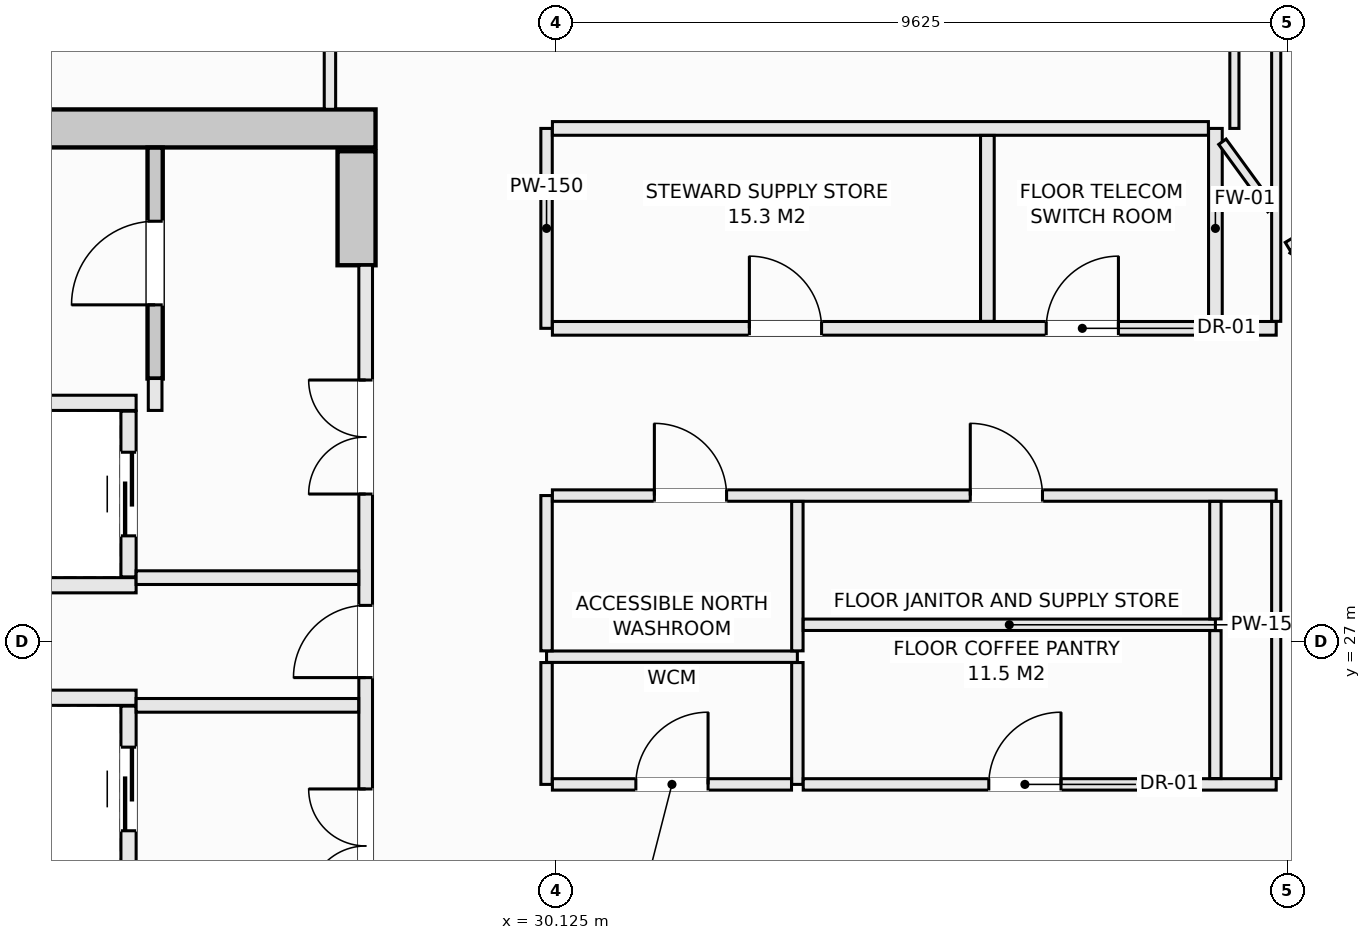
"""IFC4 building model, lengths in metres.
Left out: names, types, materials, properties, quantities, classifications, styles, units other than length and angle.
Written with IfcOpenShell. Run it as: python <this file> out.ifc"""

import sys

from ifc_helpers import new_model, si_unit, direction, frame, frame_2d, origin, place, context, subcontext, project, spatial, rectangle, extrude, element, fill, save


model = new_model("IFC4")
c1 = context("Model", 3, precision=1e-05, world=origin(), true_north=direction((0.0, 1.0)))
c2 = subcontext(c1, "Body", "Model", "MODEL_VIEW")
j1 = project(units=[si_unit("LENGTHUNIT", "METRE"), si_unit("PLANEANGLEUNIT", "RADIAN")], contexts=[c1])
p1 = place(None, origin())
s1 = spatial("IfcSite", under=j1, at=p1, CompositionType="ELEMENT")
p2 = place(p1, origin())
s2 = spatial("IfcBuilding", under=s1, at=p2, CompositionType="ELEMENT")
p3 = place(p2, frame((0.0, 0.0, 242.6)))
s3 = spatial("IfcBuildingStorey", under=s2, at=p3, CompositionType="ELEMENT", Elevation=242.6)
p4 = place(p3, frame((14.25, 33.75, -0.27), z_axis=(0.0, 0.0, 1.0), x_axis=(1.0, 0.0, 0.0)))
e1 = element("IfcWall", 1, at=p4, inside=s3, PredefinedType="SHEAR", context=c2, shape_type="SweptSolid", body=[
    extrude(rectangle(XDim=13.5, YDim=0.5, at=frame_2d((6.75, 0.0))), origin(), (0.0, 0.0, 1.0), 3.3),
])
p5 = place(p3, frame((27.5, 31.95, -0.27), z_axis=(0.0, 0.0, 1.0), x_axis=(0.0, 1.0, 0.0)))
e2 = element("IfcWall", 2, at=p5, inside=s3, PredefinedType="SHEAR", context=c2, shape_type="SweptSolid", body=[
    extrude(rectangle(XDim=1.5, YDim=0.5, at=frame_2d((0.75, 0.0))), origin(), (0.0, 0.0, 1.0), 3.3),
])
p6 = place(p3, frame((24.85, 30.46, -0.27), z_axis=(0.0, 0.0, 1.0), x_axis=(0.0, 1.0, 0.0)))
e3 = element("IfcWall", 3, at=p6, inside=s3, PredefinedType="SHEAR", context=c2, shape_type="SweptSolid", body=[
    extrude(rectangle(XDim=3.038, YDim=0.2, at=frame_2d((1.519, 0.0))), origin(), (0.0, 0.0, 1.0), 3.3),
])
p7 = place(p6, frame((0.969, 0.0, 0.27)))
e4 = element("IfcOpeningElement", 4, at=p7, cuts=e3, PredefinedType="OPENING", context=c2, shape_type="SweptSolid", body=[
    extrude(rectangle(XDim=1.1, YDim=2.15, at=frame_2d((0.55, 1.075))), frame((0.0, 0.11, 0.0), z_axis=(0.0, -1.0, 0.0), x_axis=(1.0, 0.0, 0.0)), (0.0, 0.0, 1.0), 0.22),
])
for number, where, z_axis, x_axis in (
    (5, (22.15, 30.14, 0.0), (0.0, 0.0, 1.0), (1.0, 0.0, 0.0)),
    (6, (22.15, 27.74, 0.0), (0.0, 0.0, 1.0), (1.0, 0.0, 0.0)),
):
    element("IfcWall", number, at=place(p3, frame(where, z_axis=z_axis, x_axis=x_axis)), inside=s3, PredefinedType="SOLIDWALL", context=c2, shape_type="SweptSolid", body=[
        extrude(rectangle(XDim=2.45, YDim=0.2, at=frame_2d((1.225, 0.0))), origin(), (0.0, 0.0, 1.0), 3.03),
    ])
p8 = place(p3, frame((24.5, 27.85, 0.0), z_axis=(0.0, 0.0, 1.0), x_axis=(0.0, 1.0, 0.0)))
e7 = element("IfcWall", 7, at=p8, inside=s3, PredefinedType="SOLIDWALL", context=c2, shape_type="SweptSolid", body=[
    extrude(rectangle(XDim=2.18, YDim=0.2, at=frame_2d((1.09, 0.0))), origin(), (0.0, 0.0, 1.0), 3.03),
])
p9 = place(p8, frame((0.54, 0.0, 0.0)))
e8 = element("IfcOpeningElement", 8, at=p9, cuts=e7, PredefinedType="OPENING", context=c2, shape_type="SweptSolid", body=[
    extrude(rectangle(XDim=1.1, YDim=2.2, at=frame_2d((0.55, 1.1))), frame((0.0, 0.11, 0.0), z_axis=(0.0, -1.0, 0.0), x_axis=(1.0, 0.0, 0.0)), (0.0, 0.0, 1.0), 0.22),
])
p10 = place(p3, frame((22.15, 26.26, 0.0), z_axis=(0.0, 0.0, 1.0), x_axis=(1.0, 0.0, 0.0)))
e9 = element("IfcWall", 9, at=p10, inside=s3, PredefinedType="SOLIDWALL", context=c2, shape_type="SweptSolid", body=[
    extrude(rectangle(XDim=2.45, YDim=0.2, at=frame_2d((1.225, 0.0))), origin(), (0.0, 0.0, 1.0), 3.03),
])
p11 = place(p3, frame((24.5, 23.97, 0.0), z_axis=(0.0, 0.0, 1.0), x_axis=(0.0, 1.0, 0.0)))
e10 = element("IfcWall", 10, at=p11, inside=s3, PredefinedType="SOLIDWALL", context=c2, shape_type="SweptSolid", body=[
    extrude(rectangle(XDim=2.18, YDim=0.2, at=frame_2d((1.09, 0.0))), origin(), (0.0, 0.0, 1.0), 3.03),
])
p12 = place(p11, frame((0.54, 0.0, 0.0)))
e11 = element("IfcOpeningElement", 11, at=p12, cuts=e10, PredefinedType="OPENING", context=c2, shape_type="SweptSolid", body=[
    extrude(rectangle(XDim=1.1, YDim=2.2, at=frame_2d((0.55, 1.1))), frame((0.0, 0.11, 0.0), z_axis=(0.0, -1.0, 0.0), x_axis=(1.0, 0.0, 0.0)), (0.0, 0.0, 1.0), 0.22),
])
p13 = place(p3, frame((24.85, 30.04, 0.0), z_axis=(0.0, 0.0, 1.0), x_axis=(0.0, 1.0, 0.0)))
e12 = element("IfcWall", 12, at=p13, inside=s3, PredefinedType="SOLIDWALL", context=c2, shape_type="SweptSolid", body=[
    extrude(rectangle(XDim=0.42, YDim=0.18, at=frame_2d((0.21, 0.0))), origin(), (0.0, 0.0, 1.0), 3.03),
])
p14 = place(p3, frame((27.62, 22.05, 0.0), z_axis=(0.0, 0.0, 1.0), x_axis=(0.0, 1.0, 0.0)))
e13 = element("IfcWall", 13, at=p14, inside=s3, PredefinedType="SOLIDWALL", context=c2, shape_type="SweptSolid", body=[
    extrude(rectangle(XDim=9.9, YDim=0.18, at=frame_2d((4.95, 0.0))), origin(), (0.0, 0.0, 1.0), 3.03),
])
p15 = place(p14, frame((4.475, 0.0, 0.0)))
e14 = element("IfcOpeningElement", 14, at=p15, cuts=e13, PredefinedType="OPENING", context=c2, shape_type="SweptSolid", body=[
    extrude(rectangle(XDim=0.95, YDim=2.1, at=frame_2d((0.475, 1.05))), frame((0.0, 0.1, 0.0), z_axis=(0.0, -1.0, 0.0), x_axis=(1.0, 0.0, 0.0)), (0.0, 0.0, 1.0), 0.2),
])
p16 = place(p14, frame((6.89, 0.0, 0.0)))
e15 = element("IfcOpeningElement", 15, at=p16, cuts=e13, PredefinedType="OPENING", context=c2, shape_type="SweptSolid", body=[
    extrude(rectangle(XDim=1.5, YDim=2.2, at=frame_2d((0.75, 1.1))), frame((0.0, 0.1, 0.0), z_axis=(0.0, -1.0, 0.0), x_axis=(1.0, 0.0, 0.0)), (0.0, 0.0, 1.0), 0.2),
])
p17 = place(p14, frame((1.51, 0.0, 0.0)))
e16 = element("IfcOpeningElement", 16, at=p17, cuts=e13, PredefinedType="OPENING", context=c2, shape_type="SweptSolid", body=[
    extrude(rectangle(XDim=1.5, YDim=2.2, at=frame_2d((0.75, 1.1))), frame((0.0, 0.1, 0.0), z_axis=(0.0, -1.0, 0.0), x_axis=(1.0, 0.0, 0.0)), (0.0, 0.0, 1.0), 0.2),
])
for number, where, z_axis, x_axis in (
    (17, (24.6, 27.84, 0.0), (0.0, 0.0, 1.0), (1.0, 0.0, 0.0)),
    (18, (24.6, 26.16, 0.0), (0.0, 0.0, 1.0), (1.0, 0.0, 0.0)),
):
    element("IfcWall", number, at=place(p3, frame(where, z_axis=z_axis, x_axis=x_axis)), inside=s3, PredefinedType="SOLIDWALL", context=c2, shape_type="SweptSolid", body=[
        extrude(rectangle(XDim=2.928, YDim=0.18, at=frame_2d((1.464, 0.0))), origin(), (0.0, 0.0, 1.0), 3.03),
    ])
p18 = place(p3, frame((27.15, 34.002, 0.0), z_axis=(0.0, 0.0, 1.0), x_axis=(0.0, 1.0, 0.0)))
e19 = element("IfcWall", 19, at=p18, inside=s3, PredefinedType="PARTITIONING", context=c2, shape_type="SweptSolid", body=[
    extrude(rectangle(XDim=4.198, YDim=0.15, at=frame_2d((2.099, 0.0))), origin(), (0.0, 0.0, 1.0), 3.03),
])
p19 = place(p18, frame((1.998, 0.0, 0.0)))
e20 = element("IfcOpeningElement", 20, at=p19, cuts=e19, PredefinedType="OPENING", context=c2, shape_type="SweptSolid", body=[
    extrude(rectangle(XDim=0.95, YDim=2.1, at=frame_2d((0.475, 1.05))), frame((0.0, 0.085, 0.0), z_axis=(0.0, -1.0, 0.0), x_axis=(1.0, 0.0, 0.0)), (0.0, 0.0, 1.0), 0.17),
])
p20 = place(p3, frame((30.0, 26.8, 0.0), z_axis=(0.0, 0.0, 1.0), x_axis=(1.0, 0.0, 0.0)))
e21 = element("IfcWall", 21, at=p20, inside=s3, PredefinedType="PARTITIONING", context=c2, shape_type="SweptSolid", body=[
    extrude(rectangle(XDim=3.3, YDim=0.15, at=frame_2d((1.65, 0.0))), origin(), (0.0, 0.0, 1.0), 3.03),
])
p21 = place(p3, frame((30.0, 25.12, 0.0), z_axis=(0.0, 0.0, 1.0), x_axis=(0.0, 1.0, 0.0)))
e22 = element("IfcWall", 22, at=p21, inside=s3, PredefinedType="PARTITIONING", context=c2, shape_type="SweptSolid", body=[
    extrude(rectangle(XDim=1.603, YDim=0.15, at=frame_2d((0.801, 0.0))), origin(), (0.0, 0.0, 1.0), 3.03),
])
p22 = place(p3, frame((30.0, 26.877, 0.0), z_axis=(0.0, 0.0, 1.0), x_axis=(0.0, 1.0, 0.0)))
e23 = element("IfcWall", 23, at=p22, inside=s3, PredefinedType="PARTITIONING", context=c2, shape_type="SweptSolid", body=[
    extrude(rectangle(XDim=2.043, YDim=0.15, at=frame_2d((1.021, 0.0))), origin(), (0.0, 0.0, 1.0), 3.03),
])
p23 = place(p3, frame((30.0, 31.12, 0.0), z_axis=(0.0, 0.0, 1.0), x_axis=(0.0, 1.0, 0.0)))
e24 = element("IfcWall", 24, at=p23, inside=s3, PredefinedType="PARTITIONING", context=c2, shape_type="SweptSolid", body=[
    extrude(rectangle(XDim=2.63, YDim=0.15, at=frame_2d((1.315, 0.0))), origin(), (0.0, 0.0, 1.0), 3.03),
])
p24 = place(p3, frame((30.077, 28.92, 0.0), z_axis=(0.0, 0.0, 1.0), x_axis=(1.0, 0.0, 0.0)))
e25 = element("IfcWall", 25, at=p24, inside=s3, PredefinedType="PARTITIONING", context=c2, shape_type="SweptSolid", body=[
    extrude(rectangle(XDim=9.523, YDim=0.15, at=frame_2d((4.762, 0.0))), origin(), (0.0, 0.0, 1.0), 3.03),
])
p25 = place(p24, frame((1.342, 0.0, 0.0)))
e26 = element("IfcOpeningElement", 26, at=p25, cuts=e25, PredefinedType="OPENING", context=c2, shape_type="SweptSolid", body=[
    extrude(rectangle(XDim=0.95, YDim=2.1, at=frame_2d((0.475, 1.05))), frame((0.0, 0.085, 0.0), z_axis=(0.0, -1.0, 0.0), x_axis=(1.0, 0.0, 0.0)), (0.0, 0.0, 1.0), 0.17),
])
p26 = place(p24, frame((5.498, 0.0, 0.0)))
e27 = element("IfcOpeningElement", 27, at=p26, cuts=e25, PredefinedType="OPENING", context=c2, shape_type="SweptSolid", body=[
    extrude(rectangle(XDim=0.95, YDim=2.1, at=frame_2d((0.475, 1.05))), frame((0.0, 0.085, 0.0), z_axis=(0.0, -1.0, 0.0), x_axis=(1.0, 0.0, 0.0)), (0.0, 0.0, 1.0), 0.17),
])
p27 = place(p3, frame((33.3, 25.12, 0.0), z_axis=(0.0, 0.0, 1.0), x_axis=(0.0, 1.0, 0.0)))
e28 = element("IfcWall", 28, at=p27, inside=s3, PredefinedType="PARTITIONING", context=c2, shape_type="SweptSolid", body=[
    extrude(rectangle(XDim=1.603, YDim=0.15, at=frame_2d((0.801, 0.0))), origin(), (0.0, 0.0, 1.0), 3.03),
])
p28 = place(p3, frame((33.3, 26.877, 0.0), z_axis=(0.0, 0.0, 1.0), x_axis=(0.0, 1.0, 0.0)))
e29 = element("IfcWall", 29, at=p28, inside=s3, PredefinedType="PARTITIONING", context=c2, shape_type="SweptSolid", body=[
    extrude(rectangle(XDim=1.966, YDim=0.15, at=frame_2d((0.983, 0.0))), origin(), (0.0, 0.0, 1.0), 3.03),
])
p29 = place(p3, frame((30.077, 25.12, 0.0), z_axis=(0.0, 0.0, 1.0), x_axis=(1.0, 0.0, 0.0)))
e30 = element("IfcWall", 30, at=p29, inside=s3, PredefinedType="PARTITIONING", context=c2, shape_type="SweptSolid", body=[
    extrude(rectangle(XDim=3.146, YDim=0.15, at=frame_2d((1.573, 0.0))), origin(), (0.0, 0.0, 1.0), 3.03),
])
p30 = place(p29, frame((1.098, 0.0, 0.0)))
e31 = element("IfcOpeningElement", 31, at=p30, cuts=e30, PredefinedType="OPENING", context=c2, shape_type="SweptSolid", body=[
    extrude(rectangle(XDim=0.95, YDim=2.1, at=frame_2d((0.475, 1.05))), frame((0.0, 0.085, 0.0), z_axis=(0.0, -1.0, 0.0), x_axis=(1.0, 0.0, 0.0)), (0.0, 0.0, 1.0), 0.17),
])
p31 = place(p3, frame((33.377, 25.12, 0.0), z_axis=(0.0, 0.0, 1.0), x_axis=(1.0, 0.0, 0.0)))
e32 = element("IfcWall", 32, at=p31, inside=s3, PredefinedType="PARTITIONING", context=c2, shape_type="SweptSolid", body=[
    extrude(rectangle(XDim=6.223, YDim=0.15, at=frame_2d((3.112, 0.0))), origin(), (0.0, 0.0, 1.0), 3.03),
])
p32 = place(p31, frame((2.441, 0.0, 0.0)))
e33 = element("IfcOpeningElement", 33, at=p32, cuts=e32, PredefinedType="OPENING", context=c2, shape_type="SweptSolid", body=[
    extrude(rectangle(XDim=0.95, YDim=2.1, at=frame_2d((0.475, 1.05))), frame((0.0, 0.085, 0.0), z_axis=(0.0, -1.0, 0.0), x_axis=(1.0, 0.0, 0.0)), (0.0, 0.0, 1.0), 0.17),
])
p33 = place(p3, frame((33.377, 27.22, 0.0), z_axis=(0.0, 0.0, 1.0), x_axis=(1.0, 0.0, 0.0)))
e34 = element("IfcWall", 34, at=p33, inside=s3, PredefinedType="PARTITIONING", context=c2, shape_type="SweptSolid", body=[
    extrude(rectangle(XDim=5.423, YDim=0.15, at=frame_2d((2.711, 0.0))), origin(), (0.0, 0.0, 1.0), 3.03),
])
p34 = place(p3, frame((38.8, 25.197, 0.0), z_axis=(0.0, 0.0, 1.0), x_axis=(0.0, 1.0, 0.0)))
e35 = element("IfcWall", 35, at=p34, inside=s3, PredefinedType="PARTITIONING", context=c2, shape_type="SweptSolid", body=[
    extrude(rectangle(XDim=1.946, YDim=0.15, at=frame_2d((0.973, 0.0))), origin(), (0.0, 0.0, 1.0), 3.03),
])
p35 = place(p3, frame((38.8, 27.297, 0.0), z_axis=(0.0, 0.0, 1.0), x_axis=(0.0, 1.0, 0.0)))
e36 = element("IfcWall", 36, at=p35, inside=s3, PredefinedType="PARTITIONING", context=c2, shape_type="SweptSolid", body=[
    extrude(rectangle(XDim=1.546, YDim=0.15, at=frame_2d((0.773, 0.0))), origin(), (0.0, 0.0, 1.0), 3.03),
])
p36 = place(p3, frame((38.8, 31.12, 0.0), z_axis=(0.0, 0.0, 1.0), x_axis=(0.0, 1.0, 0.0)))
e37 = element("IfcWall", 37, at=p36, inside=s3, PredefinedType="SOLIDWALL", context=c2, shape_type="SweptSolid", body=[
    extrude(rectangle(XDim=2.63, YDim=0.18, at=frame_2d((1.315, 0.0))), origin(), (0.0, 0.0, 1.0), 3.03),
])
p37 = place(p3, frame((30.077, 31.12, 0.0), z_axis=(0.0, 0.0, 1.0), x_axis=(1.0, 0.0, 0.0)))
e38 = element("IfcWall", 38, at=p37, inside=s3, PredefinedType="SOLIDWALL", context=c2, shape_type="SweptSolid", body=[
    extrude(rectangle(XDim=8.631, YDim=0.18, at=frame_2d((4.315, 0.0))), origin(), (0.0, 0.0, 1.0), 3.03),
])
p38 = place(p37, frame((2.592, 0.0, 0.0)))
e39 = element("IfcOpeningElement", 39, at=p38, cuts=e38, PredefinedType="OPENING", context=c2, shape_type="SweptSolid", body=[
    extrude(rectangle(XDim=0.95, YDim=2.1, at=frame_2d((0.475, 1.05))), frame((0.0, 0.1, 0.0), z_axis=(0.0, -1.0, 0.0), x_axis=(1.0, 0.0, 0.0)), (0.0, 0.0, 1.0), 0.2),
])
p39 = place(p37, frame((6.497, 0.0, 0.0)))
e40 = element("IfcOpeningElement", 40, at=p39, cuts=e38, PredefinedType="OPENING", context=c2, shape_type="SweptSolid", body=[
    extrude(rectangle(XDim=0.95, YDim=2.1, at=frame_2d((0.475, 1.05))), frame((0.0, 0.1, 0.0), z_axis=(0.0, -1.0, 0.0), x_axis=(1.0, 0.0, 0.0)), (0.0, 0.0, 1.0), 0.2),
])
p40 = place(p3, frame((38.892, 31.12, 0.0), z_axis=(0.0, 0.0, 1.0), x_axis=(1.0, 0.0, 0.0)))
e41 = element("IfcWall", 41, at=p40, inside=s3, PredefinedType="SOLIDWALL", context=c2, shape_type="SweptSolid", body=[
    extrude(rectangle(XDim=0.708, YDim=0.18, at=frame_2d((0.354, 0.0))), origin(), (0.0, 0.0, 1.0), 3.03),
])
p41 = place(p3, frame((30.077, 33.75, 0.0), z_axis=(0.0, 0.0, 1.0), x_axis=(1.0, 0.0, 0.0)))
e42 = element("IfcWall", 42, at=p41, inside=s3, PredefinedType="SOLIDWALL", context=c2, shape_type="SweptSolid", body=[
    extrude(rectangle(XDim=8.631, YDim=0.18, at=frame_2d((4.315, 0.0))), origin(), (0.0, 0.0, 1.0), 3.03),
])
p42 = place(p3, frame((35.8, 31.212, 0.0), z_axis=(0.0, 0.0, 1.0), x_axis=(0.0, 1.0, 0.0)))
e43 = element("IfcWall", 43, at=p42, inside=s3, PredefinedType="SOLIDWALL", context=c2, shape_type="SweptSolid", body=[
    extrude(rectangle(XDim=2.446, YDim=0.18, at=frame_2d((1.223, 0.0))), origin(), (0.0, 0.0, 1.0), 3.03),
])
p43 = place(p3, frame((39.05, 33.75, 0.0), z_axis=(0.0, 0.0, 1.0), x_axis=(0.0, 1.0, 0.0)))
e44 = element("IfcWall", 44, at=p43, inside=s3, PredefinedType="PARTITIONING", context=c2, shape_type="SweptSolid", body=[
    extrude(rectangle(XDim=1.938, YDim=0.12, at=frame_2d((0.969, 0.0))), origin(), (0.0, 0.0, 1.0), 3.03),
])
p44 = place(p3, frame((39.6, 25.197, 0.0), z_axis=(0.0, 0.0, 1.0), x_axis=(0.0, 1.0, 0.0)))
e45 = element("IfcWall", 45, at=p44, inside=s3, PredefinedType="PARTITIONING", context=c2, shape_type="SweptSolid", body=[
    extrude(rectangle(XDim=3.646, YDim=0.12, at=frame_2d((1.823, 0.0))), origin(), (0.0, 0.0, 1.0), 3.03),
])
p45 = place(p3, frame((39.6, 31.212, 0.0), z_axis=(0.0, 0.0, 1.0), x_axis=(0.0, 1.0, 0.0)))
e46 = element("IfcWall", 46, at=p45, inside=s3, PredefinedType="PARTITIONING", context=c2, shape_type="SweptSolid", body=[
    extrude(rectangle(XDim=7.871, YDim=0.12, at=frame_2d((3.936, 0.0))), origin(), (0.0, 0.0, 1.0), 3.03),
])
p46 = place(p45, frame((4.706, 0.0, 0.0)))
e47 = element("IfcOpeningElement", 47, at=p46, cuts=e46, PredefinedType="OPENING", context=c2, shape_type="SweptSolid", body=[
    extrude(rectangle(XDim=0.95, YDim=2.1, at=frame_2d((0.475, 1.05))), frame((0.0, 0.07, 0.0), z_axis=(0.0, -1.0, 0.0), x_axis=(1.0, 0.0, 0.0)), (0.0, 0.0, 1.0), 0.14),
])
p47 = place(p3, frame((39.75, 32.199, 0.0), z_axis=(0.0, 0.0, 1.0), x_axis=(0.857702120906, 0.514146935996, 0.0)))
e48 = element("IfcWall", 48, at=p47, inside=s3, PredefinedType="PARTITIONING", context=c2, shape_type="SweptSolid", body=[
    extrude(rectangle(XDim=1.441, YDim=0.12, at=frame_2d((0.721, 0.0))), origin(), (0.0, 0.0, 1.0), 3.03),
])
p48 = place(p3, frame((39.81, 32.163, 0.0), z_axis=(0.0, 0.0, 1.0), x_axis=(0.858011245414, -0.513630901273, 0.0)))
e49 = element("IfcWall", 49, at=p48, inside=s3, PredefinedType="PARTITIONING", context=c2, shape_type="SweptSolid", body=[
    extrude(rectangle(XDim=1.37, YDim=0.12, at=frame_2d((0.685, 0.0))), origin(), (0.0, 0.0, 1.0), 3.03),
])
p49 = place(p3, frame((38.892, 33.575, 0.0), z_axis=(0.0, 0.0, 1.0), x_axis=(0.5886213307, -0.808408887287, 0.0)))
e50 = element("IfcWall", 50, at=p49, inside=s3, PredefinedType="PARTITIONING", context=c2, shape_type="SweptSolid", body=[
    extrude(rectangle(XDim=1.097, YDim=0.12, at=frame_2d((0.549, 0.0))), origin(), (0.0, 0.0, 1.0), 3.03),
])
p50 = place(p7, origin())
e51 = element("IfcDoor", 51, at=p50, inside=s3, OperationType="SINGLE_SWING_LEFT", PredefinedType="DOOR", context=c2, shape_type="SweptSolid", body=[
    extrude(rectangle(XDim=1.1, YDim=2.15, at=frame_2d((0.55, 1.075))), frame((0.0, 0.025, 0.0), z_axis=(0.0, -1.0, 0.0), x_axis=(1.0, 0.0, 0.0)), (0.0, 0.0, 1.0), 0.05),
])
fill(e4, e51)
p51 = place(p9, origin())
e52 = element("IfcDoor", 52, at=p51, inside=s3, OperationType="SLIDING_TO_LEFT", PredefinedType="DOOR", context=c2, shape_type="SweptSolid", body=[
    extrude(rectangle(XDim=1.1, YDim=2.2, at=frame_2d((0.55, 1.1))), frame((0.0, 0.025, 0.0), z_axis=(0.0, -1.0, 0.0), x_axis=(1.0, 0.0, 0.0)), (0.0, 0.0, 1.0), 0.05),
])
fill(e8, e52)
p52 = place(p12, origin())
e53 = element("IfcDoor", 53, at=p52, inside=s3, OperationType="SLIDING_TO_LEFT", PredefinedType="DOOR", context=c2, shape_type="SweptSolid", body=[
    extrude(rectangle(XDim=1.1, YDim=2.2, at=frame_2d((0.55, 1.1))), frame((0.0, 0.025, 0.0), z_axis=(0.0, -1.0, 0.0), x_axis=(1.0, 0.0, 0.0)), (0.0, 0.0, 1.0), 0.05),
])
fill(e11, e53)
p53 = place(p15, origin())
e54 = element("IfcDoor", 54, at=p53, inside=s3, OperationType="SINGLE_SWING_LEFT", PredefinedType="DOOR", context=c2, shape_type="SweptSolid", body=[
    extrude(rectangle(XDim=0.95, YDim=2.1, at=frame_2d((0.475, 1.05))), frame((0.0, 0.025, 0.0), z_axis=(0.0, -1.0, 0.0), x_axis=(1.0, 0.0, 0.0)), (0.0, 0.0, 1.0), 0.05),
])
fill(e14, e54)
p54 = place(p16, origin())
e55 = element("IfcDoor", 55, at=p54, inside=s3, OperationType="DOUBLE_DOOR_SINGLE_SWING", PredefinedType="DOOR", context=c2, shape_type="SweptSolid", body=[
    extrude(rectangle(XDim=1.5, YDim=2.2, at=frame_2d((0.75, 1.1))), frame((0.0, 0.025, 0.0), z_axis=(0.0, -1.0, 0.0), x_axis=(1.0, 0.0, 0.0)), (0.0, 0.0, 1.0), 0.05),
])
fill(e15, e55)
p55 = place(p17, origin())
e56 = element("IfcDoor", 56, at=p55, inside=s3, OperationType="DOUBLE_DOOR_SINGLE_SWING", PredefinedType="DOOR", context=c2, shape_type="SweptSolid", body=[
    extrude(rectangle(XDim=1.5, YDim=2.2, at=frame_2d((0.75, 1.1))), frame((0.0, 0.025, 0.0), z_axis=(0.0, -1.0, 0.0), x_axis=(1.0, 0.0, 0.0)), (0.0, 0.0, 1.0), 0.05),
])
fill(e16, e56)
p56 = place(p25, origin())
e57 = element("IfcDoor", 57, at=p56, inside=s3, OperationType="SINGLE_SWING_LEFT", PredefinedType="DOOR", context=c2, shape_type="SweptSolid", body=[
    extrude(rectangle(XDim=0.95, YDim=2.1, at=frame_2d((0.475, 1.05))), frame((0.0, 0.025, 0.0), z_axis=(0.0, -1.0, 0.0), x_axis=(1.0, 0.0, 0.0)), (0.0, 0.0, 1.0), 0.05),
])
fill(e26, e57)
p57 = place(p30, origin())
e58 = element("IfcDoor", 58, at=p57, inside=s3, OperationType="SINGLE_SWING_RIGHT", PredefinedType="DOOR", context=c2, shape_type="SweptSolid", body=[
    extrude(rectangle(XDim=0.95, YDim=2.1, at=frame_2d((0.475, 1.05))), frame((0.0, 0.025, 0.0), z_axis=(0.0, -1.0, 0.0), x_axis=(1.0, 0.0, 0.0)), (0.0, 0.0, 1.0), 0.05),
])
fill(e31, e58)
p58 = place(p26, origin())
e59 = element("IfcDoor", 59, at=p58, inside=s3, OperationType="SINGLE_SWING_LEFT", PredefinedType="DOOR", context=c2, shape_type="SweptSolid", body=[
    extrude(rectangle(XDim=0.95, YDim=2.1, at=frame_2d((0.475, 1.05))), frame((0.0, 0.025, 0.0), z_axis=(0.0, -1.0, 0.0), x_axis=(1.0, 0.0, 0.0)), (0.0, 0.0, 1.0), 0.05),
])
fill(e27, e59)
p59 = place(p32, origin())
e60 = element("IfcDoor", 60, at=p59, inside=s3, OperationType="SINGLE_SWING_RIGHT", PredefinedType="DOOR", context=c2, shape_type="SweptSolid", body=[
    extrude(rectangle(XDim=0.95, YDim=2.1, at=frame_2d((0.475, 1.05))), frame((0.0, 0.025, 0.0), z_axis=(0.0, -1.0, 0.0), x_axis=(1.0, 0.0, 0.0)), (0.0, 0.0, 1.0), 0.05),
])
fill(e33, e60)
p60 = place(p38, origin())
e61 = element("IfcDoor", 61, at=p60, inside=s3, OperationType="SINGLE_SWING_LEFT", PredefinedType="DOOR", context=c2, shape_type="SweptSolid", body=[
    extrude(rectangle(XDim=0.95, YDim=2.1, at=frame_2d((0.475, 1.05))), frame((0.0, 0.025, 0.0), z_axis=(0.0, -1.0, 0.0), x_axis=(1.0, 0.0, 0.0)), (0.0, 0.0, 1.0), 0.05),
])
fill(e39, e61)
p61 = place(p39, origin())
e62 = element("IfcDoor", 62, at=p61, inside=s3, OperationType="SINGLE_SWING_RIGHT", PredefinedType="DOOR", context=c2, shape_type="SweptSolid", body=[
    extrude(rectangle(XDim=0.95, YDim=2.1, at=frame_2d((0.475, 1.05))), frame((0.0, 0.025, 0.0), z_axis=(0.0, -1.0, 0.0), x_axis=(1.0, 0.0, 0.0)), (0.0, 0.0, 1.0), 0.05),
])
fill(e40, e62)
save(model, sys.argv[1])
